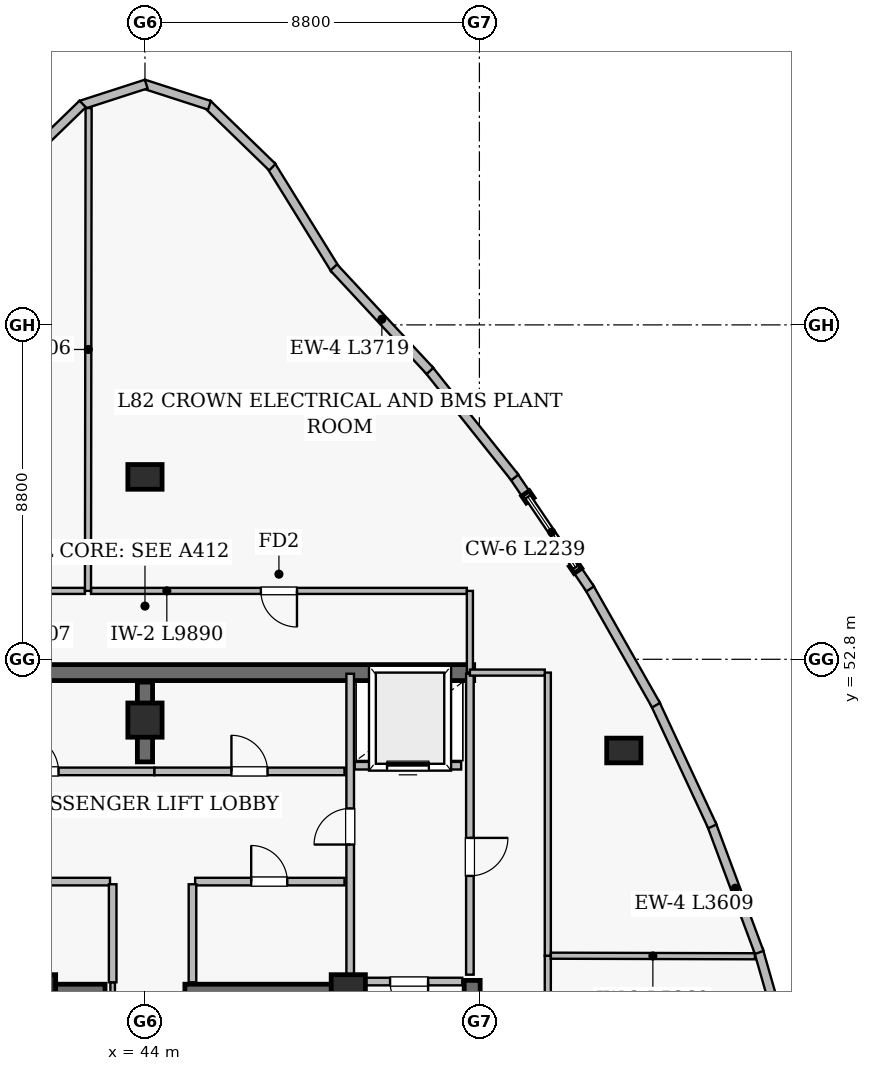
"""IFC4 building model, lengths in metres.
Left out: names, types, materials, properties, quantities, classifications, styles, units other than length and angle.
Written with IfcOpenShell. Run it as: python <this file> out.ifc"""

import sys

from ifc_helpers import new_model, si_unit, direction, frame, frame_2d, origin, origin_2d, place, context, subcontext, project, spatial, rectangle, extrude, element, fill, save


model = new_model("IFC4")
c1 = context("Model", 3, precision=1e-05, world=origin(), true_north=direction((0.0, 1.0)))
c2 = subcontext(c1, "Body", "Model", "MODEL_VIEW")
j1 = project(units=[si_unit("LENGTHUNIT", "METRE"), si_unit("PLANEANGLEUNIT", "RADIAN")], contexts=[c1])
p1 = place(None, origin())
s1 = spatial("IfcSite", under=j1, at=p1, CompositionType="ELEMENT")
p2 = place(p1, origin())
s2 = spatial("IfcBuilding", under=s1, at=p2, CompositionType="ELEMENT")
p3 = place(p2, frame((0.0, 0.0, 312.8)))
s3 = spatial("IfcBuildingStorey", under=s2, at=p3, CompositionType="ELEMENT", Elevation=312.8)
p4 = place(p3, frame((35.35, 52.45, 0.0), z_axis=(0.0, 0.0, 1.0), x_axis=(1.0, 0.0, 0.0)))
e1 = element("IfcWall", 1, at=p4, inside=s3, PredefinedType="SHEAR", context=c2, shape_type="SweptSolid", body=[
    extrude(rectangle(XDim=17.3, YDim=0.42, at=frame_2d((8.65, 0.0))), origin(), (0.0, 0.0, 1.0), 4.99),
])
p5 = place(p3, frame((52.61, 35.18, 0.0), z_axis=(0.0, 0.0, 1.0), x_axis=(0.0, 1.0, 0.0)))
e2 = element("IfcWall", 2, at=p5, inside=s3, PredefinedType="SHEAR", context=c2, shape_type="SweptSolid", body=[
    extrude(rectangle(XDim=9.17, YDim=0.42, at=frame_2d((4.585, 0.0))), origin(), (0.0, 0.0, 1.0), 4.99),
])
p6 = place(p3, frame((49.34, 35.4, 0.0), z_axis=(0.0, 0.0, 1.0), x_axis=(0.0, 1.0, 0.0)))
e3 = element("IfcWall", 3, at=p6, inside=s3, PredefinedType="SHEAR", context=c2, shape_type="SweptSolid", body=[
    extrude(rectangle(XDim=8.95, YDim=0.42, at=frame_2d((4.475, 0.0))), origin(), (0.0, 0.0, 1.0), 4.99),
])
p7 = place(p3, frame((44.0, 50.1, 0.0), z_axis=(0.0, 0.0, 1.0), x_axis=(0.0, 1.0, 0.0)))
e4 = element("IfcWall", 4, at=p7, inside=s3, PredefinedType="SHEAR", context=c2, shape_type="SweptSolid", body=[
    extrude(rectangle(XDim=2.1, YDim=0.4, at=frame_2d((1.05, 0.0))), origin(), (0.0, 0.0, 1.0), 4.99),
])
for number, where, z_axis, x_axis in (
    (5, (38.75, 44.05, 0.0), (0.0, 0.0, 1.0), (1.0, 0.0, 0.0)),
    (6, (45.05, 44.05, 0.0), (0.0, 0.0, 1.0), (1.0, 0.0, 0.0)),
):
    element("IfcWall", number, at=place(p3, frame(where, z_axis=z_axis, x_axis=x_axis)), inside=s3, PredefinedType="SHEAR", context=c2, shape_type="SweptSolid", body=[
        extrude(rectangle(XDim=4.2, YDim=0.4, at=frame_2d((2.1, 0.0))), origin(), (0.0, 0.0, 1.0), 4.99),
    ])
for number, where, z_axis, x_axis in (
    (7, (49.35, 44.05, 0.0), (0.0, 0.0, 1.0), (1.0, 0.0, 0.0)),
    (8, (44.0, 51.2, 0.0), (0.0, 0.0, 1.0), (1.0, 0.0, 0.0)),
    (9, (41.2, 44.05, 0.0), (0.0, 0.0, 1.0), (1.0, 0.0, 0.0)),
):
    element("IfcColumn", number, at=place(p3, frame(where, z_axis=z_axis, x_axis=x_axis)), inside=s3, PredefinedType="COLUMN", context=c2, shape_type="SweptSolid", body=[
        extrude(rectangle(XDim=0.9, YDim=0.9, at=origin_2d()), origin(), (0.0, 0.0, 1.0), 5.2),
    ])
for number, where, z_axis, x_axis in (
    (10, (44.0, 57.6, 0.0), (0.0, 0.0, 1.0), (1.0, 0.0, 0.0)),
    (11, (56.6, 50.4, 0.0), (0.0, 0.0, 1.0), (1.0, 0.0, 0.0)),
):
    element("IfcColumn", number, at=place(p3, frame(where, z_axis=z_axis, x_axis=x_axis)), inside=s3, PredefinedType="COLUMN", context=c2, shape_type="SweptSolid", body=[
        extrude(rectangle(XDim=0.9, YDim=0.65, at=origin_2d()), origin(), (0.0, 0.0, 1.0), 5.2),
    ])
p8 = place(p3, frame((49.01, 63.056, 0.0), z_axis=(0.0, 0.0, 1.0), x_axis=(-0.526110187608, 0.850416410058, 0.0)))
e12 = element("IfcWall", 12, at=p8, inside=s3, PredefinedType="SOLIDWALL", context=c2, shape_type="SweptSolid", body=[
    extrude(rectangle(XDim=3.233, YDim=0.24, at=frame_2d((1.616, 0.0))), origin(), (0.0, 0.0, 1.0), 4.99),
])
p9 = place(p3, frame((47.352, 65.751, 0.0), z_axis=(0.0, 0.0, 1.0), x_axis=(-0.717711443968, 0.69634063733, 0.0)))
e13 = element("IfcWall", 13, at=p9, inside=s3, PredefinedType="SOLIDWALL", context=c2, shape_type="SweptSolid", body=[
    extrude(rectangle(XDim=2.388, YDim=0.24, at=frame_2d((1.194, 0.0))), origin(), (0.0, 0.0, 1.0), 4.99),
])
for number, where, z_axis, x_axis in (
    (14, (45.697, 67.378, 0.0), (0.0, 0.0, 1.0), (-0.952, 0.308, 0.0)),
    (15, (44.033, 67.938, 0.0), (0.0, 0.0, 1.0), (-0.952, -0.308, 0.0)),
):
    element("IfcWall", number, at=place(p3, frame(where, z_axis=z_axis, x_axis=x_axis)), inside=s3, PredefinedType="SOLIDWALL", context=c2, shape_type="SweptSolid", body=[
        extrude(rectangle(XDim=1.818, YDim=0.24, at=frame_2d((0.909, 0.0))), origin(), (0.0, 0.0, 1.0), 4.99),
    ])
p10 = place(p3, frame((42.361, 67.414, 0.0), z_axis=(0.0, 0.0, 1.0), x_axis=(-0.717711443968, -0.69634063733, 0.0)))
e16 = element("IfcWall", 16, at=p10, inside=s3, PredefinedType="SOLIDWALL", context=c2, shape_type="SweptSolid", body=[
    extrude(rectangle(XDim=2.388, YDim=0.24, at=frame_2d((1.194, 0.0))), origin(), (0.0, 0.0, 1.0), 4.99),
])
p11 = place(p3, frame((61.146, 41.639, 0.0), z_axis=(0.0, 0.0, 1.0), x_axis=(-0.274897629025, 0.961473501224, 0.0)))
e17 = element("IfcWall", 17, at=p11, inside=s3, PredefinedType="SOLIDWALL", context=c2, shape_type="SweptSolid", body=[
    extrude(rectangle(XDim=3.654, YDim=0.24, at=frame_2d((1.827, 0.0))), origin(), (0.0, 0.0, 1.0), 4.99),
])
p12 = place(p3, frame((60.163, 45.085, 0.0), z_axis=(0.0, 0.0, 1.0), x_axis=(-0.349054279873, 0.937102507574, 0.0)))
e18 = element("IfcWall", 18, at=p12, inside=s3, PredefinedType="SOLIDWALL", context=c2, shape_type="SweptSolid", body=[
    extrude(rectangle(XDim=3.609, YDim=0.24, at=frame_2d((1.805, 0.0))), origin(), (0.0, 0.0, 1.0), 4.99),
])
p13 = place(p3, frame((58.931, 48.403, 0.0), z_axis=(0.0, 0.0, 1.0), x_axis=(-0.422322757118, 0.906445524464, 0.0)))
e19 = element("IfcWall", 19, at=p13, inside=s3, PredefinedType="SOLIDWALL", context=c2, shape_type="SweptSolid", body=[
    extrude(rectangle(XDim=3.587, YDim=0.24, at=frame_2d((1.793, 0.0))), origin(), (0.0, 0.0, 1.0), 4.99),
])
p14 = place(p3, frame((57.448, 51.592, 0.0), z_axis=(0.0, 0.0, 1.0), x_axis=(-0.49340236427, 0.869801188165, 0.0)))
e20 = element("IfcWall", 20, at=p14, inside=s3, PredefinedType="SOLIDWALL", context=c2, shape_type="SweptSolid", body=[
    extrude(rectangle(XDim=3.587, YDim=0.24, at=frame_2d((1.793, 0.0))), origin(), (0.0, 0.0, 1.0), 4.99),
])
p15 = place(p3, frame((55.715, 54.653, 0.0), z_axis=(0.0, 0.0, 1.0), x_axis=(-0.560917046494, 0.827872011214, 0.0)))
e21 = element("IfcWall", 21, at=p15, inside=s3, PredefinedType="SOLIDWALL", context=c2, shape_type="SweptSolid", body=[
    extrude(rectangle(XDim=0.705, YDim=0.24, at=frame_2d((0.353, 0.0))), origin(), (0.0, 0.0, 1.0), 4.99),
])
p16 = place(p3, frame((54.086, 57.057, 0.0), z_axis=(0.0, 0.0, 1.0), x_axis=(-0.560756297025, 0.827980902767, 0.0)))
e22 = element("IfcWall", 22, at=p16, inside=s3, PredefinedType="SOLIDWALL", context=c2, shape_type="SweptSolid", body=[
    extrude(rectangle(XDim=0.705, YDim=0.24, at=frame_2d((0.353, 0.0))), origin(), (0.0, 0.0, 1.0), 4.99),
])
p17 = place(p3, frame((53.732, 57.584, 0.0), z_axis=(0.0, 0.0, 1.0), x_axis=(-0.623626980574, 0.781722066402, 0.0)))
e23 = element("IfcWall", 23, at=p17, inside=s3, PredefinedType="SOLIDWALL", context=c2, shape_type="SweptSolid", body=[
    extrude(rectangle(XDim=3.654, YDim=0.24, at=frame_2d((1.827, 0.0))), origin(), (0.0, 0.0, 1.0), 4.99),
])
p18 = place(p3, frame((51.5, 60.388, 0.0), z_axis=(0.0, 0.0, 1.0), x_axis=(-0.68087147599, 0.732402917241, 0.0)))
e24 = element("IfcWall", 24, at=p18, inside=s3, PredefinedType="SOLIDWALL", context=c2, shape_type="SweptSolid", body=[
    extrude(rectangle(XDim=3.719, YDim=0.24, at=frame_2d((1.859, 0.0))), origin(), (0.0, 0.0, 1.0), 4.99),
])
p19 = place(p3, frame((42.42, 54.6, 0.0), z_axis=(0.0, 0.0, 1.0), x_axis=(-1.0, 0.0, 0.0)))
e25 = element("IfcWall", 25, at=p19, inside=s3, PredefinedType="SOLIDWALL", context=c2, shape_type="SweptSolid", body=[
    extrude(rectangle(XDim=10.007, YDim=0.16, at=frame_2d((5.003, 0.0))), origin(), (0.0, 0.0, 1.0), 4.178),
])
p20 = place(p19, frame((4.529, 0.0, 0.0)))
e26 = element("IfcOpeningElement", 26, at=p20, cuts=e25, PredefinedType="OPENING", context=c2, shape_type="SweptSolid", body=[
    extrude(rectangle(XDim=0.95, YDim=2.15, at=frame_2d((0.475, 1.075))), frame((0.0, 0.09, 0.0), z_axis=(0.0, -1.0, 0.0), x_axis=(1.0, 0.0, 0.0)), (0.0, 0.0, 1.0), 0.18),
])
p21 = place(p3, frame((52.47, 54.6, 0.0), z_axis=(0.0, 0.0, 1.0), x_axis=(-1.0, 0.0, 0.0)))
e27 = element("IfcWall", 27, at=p21, inside=s3, PredefinedType="SOLIDWALL", context=c2, shape_type="SweptSolid", body=[
    extrude(rectangle(XDim=9.89, YDim=0.16, at=frame_2d((4.945, 0.0))), origin(), (0.0, 0.0, 1.0), 4.178),
])
p22 = place(p21, frame((4.47, 0.0, 0.0)))
e28 = element("IfcOpeningElement", 28, at=p22, cuts=e27, PredefinedType="OPENING", context=c2, shape_type="SweptSolid", body=[
    extrude(rectangle(XDim=0.95, YDim=2.15, at=frame_2d((0.475, 1.075))), frame((0.0, 0.09, 0.0), z_axis=(0.0, -1.0, 0.0), x_axis=(1.0, 0.0, 0.0)), (0.0, 0.0, 1.0), 0.18),
])
p23 = place(p3, frame((43.15, 35.6, 0.0), z_axis=(0.0, 0.0, 1.0), x_axis=(0.0, 1.0, 0.0)))
e29 = element("IfcWall", 29, at=p23, inside=s3, PredefinedType="PARTITIONING", context=c2, shape_type="SweptSolid", body=[
    extrude(rectangle(XDim=8.7, YDim=0.12, at=frame_2d((4.35, 0.0))), origin(), (0.0, 0.0, 1.0), 4.99),
])
p24 = place(p23, frame((0.66, 0.0, 0.0)))
e30 = element("IfcOpeningElement", 30, at=p24, cuts=e29, PredefinedType="OPENING", context=c2, shape_type="SweptSolid", body=[
    extrude(rectangle(XDim=0.88, YDim=2.1, at=frame_2d((0.44, 1.05))), frame((0.0, 0.07, 0.0), z_axis=(0.0, -1.0, 0.0), x_axis=(1.0, 0.0, 0.0)), (0.0, 0.0, 1.0), 0.14),
])
p25 = place(p23, frame((4.74, 0.0, 0.0)))
e31 = element("IfcOpeningElement", 31, at=p25, cuts=e29, PredefinedType="OPENING", context=c2, shape_type="SweptSolid", body=[
    extrude(rectangle(XDim=0.92, YDim=2.1, at=frame_2d((0.46, 1.05))), frame((0.0, 0.07, 0.0), z_axis=(0.0, -1.0, 0.0), x_axis=(1.0, 0.0, 0.0)), (0.0, 0.0, 1.0), 0.14),
])
p26 = place(p3, frame((52.55, 44.5, 0.0), z_axis=(0.0, 0.0, 1.0), x_axis=(0.0, 1.0, 0.0)))
e32 = element("IfcWall", 32, at=p26, inside=s3, PredefinedType="SOLIDWALL", context=c2, shape_type="SweptSolid", body=[
    extrude(rectangle(XDim=7.92, YDim=0.2, at=frame_2d((3.96, 0.0))), origin(), (0.0, 0.0, 1.0), 4.99),
])
p27 = place(p26, frame((2.6, 0.0, 0.0)))
e33 = element("IfcOpeningElement", 33, at=p27, cuts=e32, PredefinedType="OPENING", context=c2, shape_type="SweptSolid", body=[
    extrude(rectangle(XDim=1.0, YDim=2.15, at=frame_2d((0.5, 1.075))), frame((0.0, 0.11, 0.0), z_axis=(0.0, -1.0, 0.0), x_axis=(1.0, 0.0, 0.0)), (0.0, 0.0, 1.0), 0.22),
])
p28 = place(p3, frame((49.4, 44.5, 0.0), z_axis=(0.0, 0.0, 1.0), x_axis=(0.0, 1.0, 0.0)))
e34 = element("IfcWall", 34, at=p28, inside=s3, PredefinedType="SOLIDWALL", context=c2, shape_type="SweptSolid", body=[
    extrude(rectangle(XDim=7.92, YDim=0.2, at=frame_2d((3.96, 0.0))), origin(), (0.0, 0.0, 1.0), 4.078),
])
p29 = place(p28, frame((3.425, 0.0, 0.0)))
e35 = element("IfcOpeningElement", 35, at=p29, cuts=e34, PredefinedType="OPENING", context=c2, shape_type="SweptSolid", body=[
    extrude(rectangle(XDim=0.95, YDim=2.15, at=frame_2d((0.475, 1.075))), frame((0.0, 0.11, 0.0), z_axis=(0.0, -1.0, 0.0), x_axis=(1.0, 0.0, 0.0)), (0.0, 0.0, 1.0), 0.22),
])
p30 = place(p3, frame((38.75, 49.85, 0.0), z_axis=(0.0, 0.0, 1.0), x_axis=(1.0, 0.0, 0.0)))
e36 = element("IfcWall", 36, at=p30, inside=s3, PredefinedType="SOLIDWALL", context=c2, shape_type="SweptSolid", body=[
    extrude(rectangle(XDim=5.5, YDim=0.2, at=frame_2d((2.75, 0.0))), origin(), (0.0, 0.0, 1.0), 4.99),
])
p31 = place(p30, frame((2.025, 0.0, 0.0)))
e37 = element("IfcOpeningElement", 37, at=p31, cuts=e36, PredefinedType="OPENING", context=c2, shape_type="SweptSolid", body=[
    extrude(rectangle(XDim=0.95, YDim=2.15, at=frame_2d((0.475, 1.075))), frame((0.0, 0.11, 0.0), z_axis=(0.0, -1.0, 0.0), x_axis=(1.0, 0.0, 0.0)), (0.0, 0.0, 1.0), 0.22),
])
p32 = place(p3, frame((44.25, 49.85, 0.0), z_axis=(0.0, 0.0, 1.0), x_axis=(1.0, 0.0, 0.0)))
e38 = element("IfcWall", 38, at=p32, inside=s3, PredefinedType="SOLIDWALL", context=c2, shape_type="SweptSolid", body=[
    extrude(rectangle(XDim=5.0, YDim=0.2, at=frame_2d((2.5, 0.0))), origin(), (0.0, 0.0, 1.0), 4.078),
])
p33 = place(p32, frame((2.025, 0.0, 0.0)))
e39 = element("IfcOpeningElement", 39, at=p33, cuts=e38, PredefinedType="OPENING", context=c2, shape_type="SweptSolid", body=[
    extrude(rectangle(XDim=0.95, YDim=2.15, at=frame_2d((0.475, 1.075))), frame((0.0, 0.11, 0.0), z_axis=(0.0, -1.0, 0.0), x_axis=(1.0, 0.0, 0.0)), (0.0, 0.0, 1.0), 0.22),
])
p34 = place(p3, frame((38.75, 46.95, 0.0), z_axis=(0.0, 0.0, 1.0), x_axis=(1.0, 0.0, 0.0)))
e40 = element("IfcWall", 40, at=p34, inside=s3, PredefinedType="SOLIDWALL", context=c2, shape_type="SweptSolid", body=[
    extrude(rectangle(XDim=4.33, YDim=0.2, at=frame_2d((2.165, 0.0))), origin(), (0.0, 0.0, 1.0), 4.99),
])
p35 = place(p34, frame((1.675, 0.0, 0.0)))
e41 = element("IfcOpeningElement", 41, at=p35, cuts=e40, PredefinedType="OPENING", context=c2, shape_type="SweptSolid", body=[
    extrude(rectangle(XDim=0.95, YDim=2.1, at=frame_2d((0.475, 1.05))), frame((0.0, 0.11, 0.0), z_axis=(0.0, -1.0, 0.0), x_axis=(1.0, 0.0, 0.0)), (0.0, 0.0, 1.0), 0.22),
])
p36 = place(p3, frame((45.32, 46.95, 0.0), z_axis=(0.0, 0.0, 1.0), x_axis=(1.0, 0.0, 0.0)))
e42 = element("IfcWall", 42, at=p36, inside=s3, PredefinedType="SOLIDWALL", context=c2, shape_type="SweptSolid", body=[
    extrude(rectangle(XDim=3.93, YDim=0.2, at=frame_2d((1.965, 0.0))), origin(), (0.0, 0.0, 1.0), 4.078),
])
p37 = place(p36, frame((1.475, 0.0, 0.0)))
e43 = element("IfcOpeningElement", 43, at=p37, cuts=e42, PredefinedType="OPENING", context=c2, shape_type="SweptSolid", body=[
    extrude(rectangle(XDim=0.95, YDim=2.1, at=frame_2d((0.475, 1.05))), frame((0.0, 0.11, 0.0), z_axis=(0.0, -1.0, 0.0), x_axis=(1.0, 0.0, 0.0)), (0.0, 0.0, 1.0), 0.22),
])
p38 = place(p3, frame((49.55, 44.32, 0.0), z_axis=(0.0, 0.0, 1.0), x_axis=(1.0, 0.0, 0.0)))
e44 = element("IfcWall", 44, at=p38, inside=s3, PredefinedType="SOLIDWALL", context=c2, shape_type="SweptSolid", body=[
    extrude(rectangle(XDim=2.8, YDim=0.2, at=frame_2d((1.4, 0.0))), origin(), (0.0, 0.0, 1.0), 4.078),
])
p39 = place(p38, frame((0.9, 0.0, 0.0)))
e45 = element("IfcOpeningElement", 45, at=p39, cuts=e44, PredefinedType="OPENING", context=c2, shape_type="SweptSolid", body=[
    extrude(rectangle(XDim=1.0, YDim=2.15, at=frame_2d((0.5, 1.075))), frame((0.0, 0.11, 0.0), z_axis=(0.0, -1.0, 0.0), x_axis=(1.0, 0.0, 0.0)), (0.0, 0.0, 1.0), 0.22),
])
p40 = place(p3, frame((49.52, 50.0, 0.0), z_axis=(0.0, 0.0, 1.0), x_axis=(1.0, 0.0, 0.0)))
e46 = element("IfcWall", 46, at=p40, inside=s3, PredefinedType="SOLIDWALL", context=c2, shape_type="SweptSolid", body=[
    extrude(rectangle(XDim=2.8, YDim=0.2, at=frame_2d((1.4, 0.0))), origin(), (0.0, 0.0, 1.0), 4.99),
])
p41 = place(p40, frame((0.85, 0.0, 0.0)))
e47 = element("IfcOpeningElement", 47, at=p41, cuts=e46, PredefinedType="OPENING", context=c2, shape_type="SweptSolid", body=[
    extrude(rectangle(XDim=1.1, YDim=2.15, at=frame_2d((0.55, 1.075))), frame((0.0, 0.11, 0.0), z_axis=(0.0, -1.0, 0.0), x_axis=(1.0, 0.0, 0.0)), (0.0, 0.0, 1.0), 0.22),
])
p42 = place(p3, frame((42.5, 54.6, 0.0), z_axis=(0.0, 0.0, 1.0), x_axis=(0.001345040384, 0.999999095433, 0.0)))
e48 = element("IfcWall", 48, at=p42, inside=s3, PredefinedType="SOLIDWALL", context=c2, shape_type="SweptSolid", body=[
    extrude(rectangle(XDim=12.706, YDim=0.16, at=frame_2d((6.353, 0.0))), origin(), (0.0, 0.0, 1.0), 4.178),
])
p43 = place(p3, frame((54.6, 33.4, 0.0), z_axis=(0.0, 0.0, 1.0), x_axis=(0.0, 1.0, 0.0)))
e49 = element("IfcWall", 49, at=p43, inside=s3, PredefinedType="SOLIDWALL", context=c2, shape_type="SweptSolid", body=[
    extrude(rectangle(XDim=11.6, YDim=0.16, at=frame_2d((5.8, 0.0))), origin(), (0.0, 0.0, 1.0), 4.178),
])
p44 = place(p3, frame((54.6, 45.0, 0.0), z_axis=(0.0, 0.0, 1.0), x_axis=(0.0, 1.0, 0.0)))
e50 = element("IfcWall", 50, at=p44, inside=s3, PredefinedType="SOLIDWALL", context=c2, shape_type="SweptSolid", body=[
    extrude(rectangle(XDim=7.45, YDim=0.16, at=frame_2d((3.725, 0.0))), origin(), (0.0, 0.0, 1.0), 4.178),
])
p45 = place(p3, frame((60.049, 44.985, 0.0), z_axis=(0.0, 0.0, 1.0), x_axis=(-0.999996153217, 0.002773725234, 0.0)))
e51 = element("IfcWall", 51, at=p45, inside=s3, PredefinedType="SOLIDWALL", context=c2, shape_type="SweptSolid", body=[
    extrude(rectangle(XDim=5.369, YDim=0.16, at=frame_2d((2.685, 0.0))), origin(), (0.0, 0.0, 1.0), 4.178),
])
for number, where, z_axis, x_axis in (
    (52, (43.15, 44.3, 0.0), (0.0, 0.0, 1.0), (0.0, 1.0, 0.0)),
    (53, (45.25, 44.3, 0.0), (0.0, 0.0, 1.0), (0.0, 1.0, 0.0)),
):
    element("IfcWall", number, at=place(p3, frame(where, z_axis=z_axis, x_axis=x_axis)), inside=s3, PredefinedType="SOLIDWALL", context=c2, shape_type="SweptSolid", body=[
        extrude(rectangle(XDim=2.58, YDim=0.2, at=frame_2d((1.29, 0.0))), origin(), (0.0, 0.0, 1.0), 4.99),
    ])
p46 = place(p3, frame((52.55, 52.45, 0.0), z_axis=(0.0, 0.0, 1.0), x_axis=(0.0, 1.0, 0.0)))
e54 = element("IfcWall", 54, at=p46, inside=s3, PredefinedType="SOLIDWALL", context=c2, shape_type="SweptSolid", body=[
    extrude(rectangle(XDim=2.15, YDim=0.16, at=frame_2d((1.075, 0.0))), origin(), (0.0, 0.0, 1.0), 4.178),
])
p47 = place(p3, frame((54.52, 52.45, 0.0), z_axis=(0.0, 0.0, 1.0), x_axis=(-1.0, 0.0, 0.0)))
e55 = element("IfcWall", 55, at=p47, inside=s3, PredefinedType="SOLIDWALL", context=c2, shape_type="SweptSolid", body=[
    extrude(rectangle(XDim=1.97, YDim=0.16, at=frame_2d((0.985, 0.0))), origin(), (0.0, 0.0, 1.0), 4.178),
])
p48 = place(p39, frame((1.0, 0.0, 0.0), z_axis=(0.0, 0.0, 1.0), x_axis=(-1.0, 0.0, 0.0)))
e56 = element("IfcDoor", 56, at=p48, inside=s3, OperationType="SINGLE_SWING_RIGHT", PredefinedType="DOOR", context=c2, shape_type="SweptSolid", body=[
    extrude(rectangle(XDim=1.0, YDim=2.15, at=frame_2d((0.5, 1.075))), frame((0.0, 0.025, 0.0), z_axis=(0.0, -1.0, 0.0), x_axis=(1.0, 0.0, 0.0)), (0.0, 0.0, 1.0), 0.05),
])
fill(e45, e56)
p49 = place(p27, frame((1.0, 0.0, 0.0), z_axis=(0.0, 0.0, 1.0), x_axis=(-1.0, 0.0, 0.0)))
e57 = element("IfcDoor", 57, at=p49, inside=s3, OperationType="SINGLE_SWING_RIGHT", PredefinedType="DOOR", context=c2, shape_type="SweptSolid", body=[
    extrude(rectangle(XDim=1.0, YDim=2.15, at=frame_2d((0.5, 1.075))), frame((0.0, 0.025, 0.0), z_axis=(0.0, -1.0, 0.0), x_axis=(1.0, 0.0, 0.0)), (0.0, 0.0, 1.0), 0.05),
])
fill(e33, e57)
p50 = place(p29, origin())
e58 = element("IfcDoor", 58, at=p50, inside=s3, OperationType="SINGLE_SWING_LEFT", PredefinedType="DOOR", context=c2, shape_type="SweptSolid", body=[
    extrude(rectangle(XDim=0.95, YDim=2.15, at=frame_2d((0.475, 1.075))), frame((0.0, 0.025, 0.0), z_axis=(0.0, -1.0, 0.0), x_axis=(1.0, 0.0, 0.0)), (0.0, 0.0, 1.0), 0.05),
])
fill(e35, e58)
p51 = place(p41, origin())
e59 = element("IfcDoor", 59, at=p51, inside=s3, OperationType="SLIDING_TO_LEFT", PredefinedType="DOOR", context=c2, shape_type="SweptSolid", body=[
    extrude(rectangle(XDim=1.1, YDim=2.15, at=frame_2d((0.55, 1.075))), frame((0.0, 0.025, 0.0), z_axis=(0.0, -1.0, 0.0), x_axis=(1.0, 0.0, 0.0)), (0.0, 0.0, 1.0), 0.05),
])
fill(e47, e59)
p52 = place(p31, origin())
e60 = element("IfcDoor", 60, at=p52, inside=s3, OperationType="SINGLE_SWING_LEFT", PredefinedType="DOOR", context=c2, shape_type="SweptSolid", body=[
    extrude(rectangle(XDim=0.95, YDim=2.15, at=frame_2d((0.475, 1.075))), frame((0.0, 0.025, 0.0), z_axis=(0.0, -1.0, 0.0), x_axis=(1.0, 0.0, 0.0)), (0.0, 0.0, 1.0), 0.05),
])
fill(e37, e60)
p53 = place(p33, origin())
e61 = element("IfcDoor", 61, at=p53, inside=s3, OperationType="SINGLE_SWING_LEFT", PredefinedType="DOOR", context=c2, shape_type="SweptSolid", body=[
    extrude(rectangle(XDim=0.95, YDim=2.15, at=frame_2d((0.475, 1.075))), frame((0.0, 0.025, 0.0), z_axis=(0.0, -1.0, 0.0), x_axis=(1.0, 0.0, 0.0)), (0.0, 0.0, 1.0), 0.05),
])
fill(e39, e61)
p54 = place(p37, origin())
e62 = element("IfcDoor", 62, at=p54, inside=s3, OperationType="SINGLE_SWING_LEFT", PredefinedType="DOOR", context=c2, shape_type="SweptSolid", body=[
    extrude(rectangle(XDim=0.95, YDim=2.1, at=frame_2d((0.475, 1.05))), frame((0.0, 0.025, 0.0), z_axis=(0.0, -1.0, 0.0), x_axis=(1.0, 0.0, 0.0)), (0.0, 0.0, 1.0), 0.05),
])
fill(e43, e62)
p55 = place(p22, origin())
e63 = element("IfcDoor", 63, at=p55, inside=s3, OperationType="SINGLE_SWING_LEFT", PredefinedType="DOOR", context=c2, shape_type="SweptSolid", body=[
    extrude(rectangle(XDim=0.95, YDim=2.15, at=frame_2d((0.475, 1.075))), frame((0.0, 0.025, 0.0), z_axis=(0.0, -1.0, 0.0), x_axis=(1.0, 0.0, 0.0)), (0.0, 0.0, 1.0), 0.05),
])
fill(e28, e63)
save(model, sys.argv[1])
